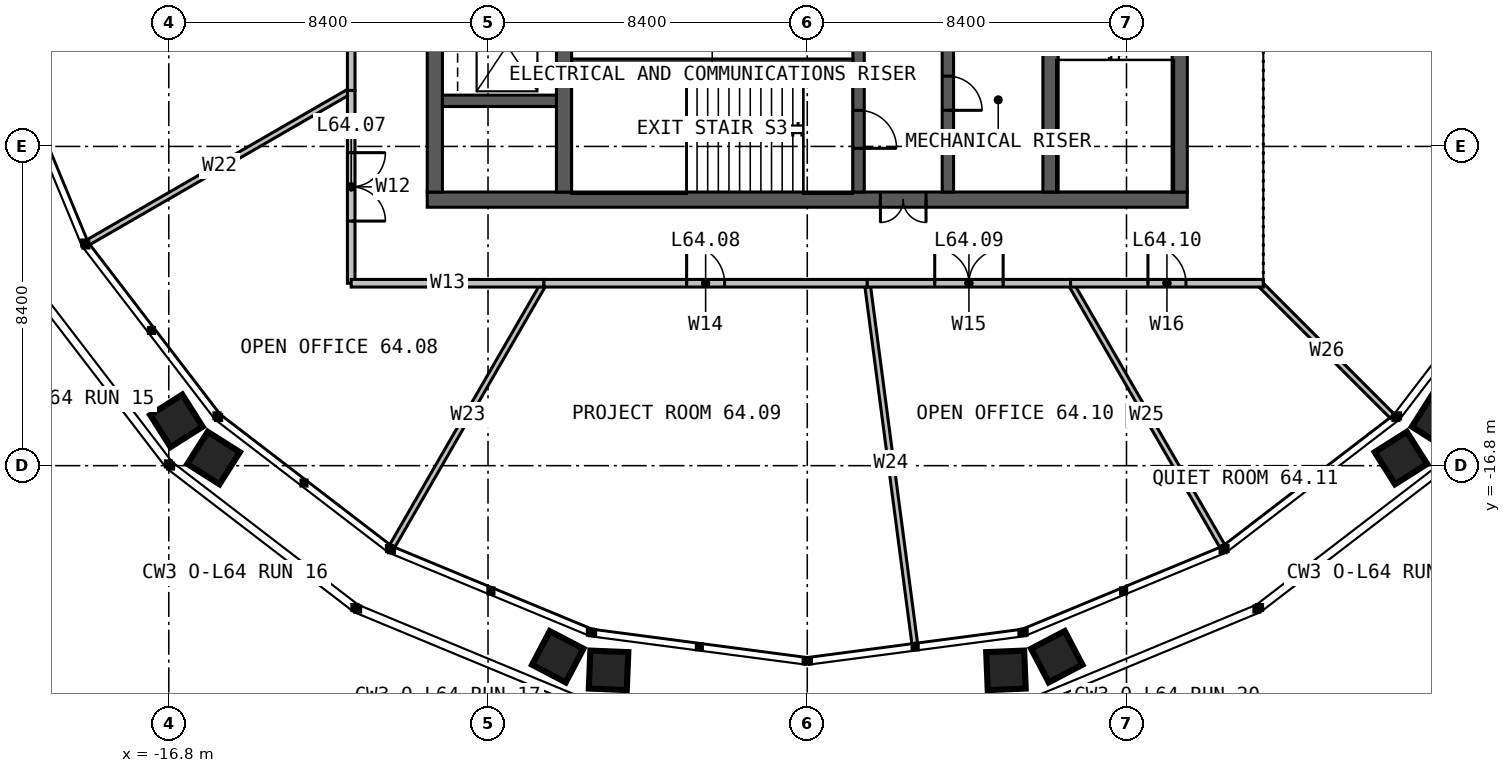
"""IFC4 building model, lengths in metres.
Left out: names, types, materials, properties, quantities, classifications, styles, units other than length and angle.
Written with IfcOpenShell. Run it as: python <this file> out.ifc"""

import sys

from ifc_helpers import new_model, si_unit, direction, frame, frame_2d, origin, place, context, subcontext, project, spatial, rectangle, extrude, element, fill, save


model = new_model("IFC4")
c1 = context("Model", 3, precision=1e-05, world=origin(), true_north=direction((0.0, 1.0)))
c2 = subcontext(c1, "Body", "Model", "MODEL_VIEW")
j1 = project(units=[si_unit("LENGTHUNIT", "METRE"), si_unit("PLANEANGLEUNIT", "RADIAN")], contexts=[c1])
p1 = place(None, origin())
s1 = spatial("IfcSite", under=j1, at=p1, CompositionType="ELEMENT")
p2 = place(p1, origin())
s2 = spatial("IfcBuilding", under=s1, at=p2, CompositionType="ELEMENT")
p3 = place(p2, frame((0.0, 0.0, 264.0)))
s3 = spatial("IfcBuildingStorey", under=s2, at=p3, CompositionType="ELEMENT", Elevation=264.0)
p4 = place(p3, frame((10.0, -9.8, 0.0), z_axis=(0.0, 0.0, 1.0), x_axis=(-1.0, 0.0, 0.0)))
e1 = element("IfcWall", 1, at=p4, inside=s3, PredefinedType="SOLIDWALL", context=c2, shape_type="SweptSolid", body=[
    extrude(rectangle(XDim=20.0, YDim=0.4, at=frame_2d((10.0, 0.0))), origin(), (0.0, 0.0, 1.0), 4.0),
])
p5 = place(p4, frame((6.875, 0.0, 0.0)))
e2 = element("IfcOpeningElement", 2, at=p5, cuts=e1, PredefinedType="OPENING", context=c2, shape_type="SweptSolid", body=[
    extrude(rectangle(XDim=1.2, YDim=2.2, at=frame_2d((0.6, 1.1))), frame((0.0, 0.21, 0.0), z_axis=(0.0, -1.0, 0.0), x_axis=(1.0, 0.0, 0.0)), (0.0, 0.0, 1.0), 0.42),
])
for number, where, z_axis, x_axis in (
    (3, (9.8, -9.6, 0.0), (0.0, 0.0, 1.0), (0.0, 1.0, 0.0)),
    (4, (-9.8, 9.6, 0.0), (0.0, 0.0, 1.0), (0.0, -1.0, 0.0)),
):
    element("IfcWall", number, at=place(p3, frame(where, z_axis=z_axis, x_axis=x_axis)), inside=s3, PredefinedType="SOLIDWALL", context=c2, shape_type="SweptSolid", body=[
        extrude(rectangle(XDim=19.2, YDim=0.4, at=frame_2d((9.6, 0.0))), origin(), (0.0, 0.0, 1.0), 4.0),
    ])
p6 = place(p3, frame((-6.4, -9.6, 0.0), z_axis=(0.0, 0.0, 1.0), x_axis=(0.0, 1.0, 0.0)))
e5 = element("IfcWall", 5, at=p6, inside=s3, PredefinedType="SOLIDWALL", context=c2, shape_type="SweptSolid", body=[
    extrude(rectangle(XDim=19.2, YDim=0.4, at=frame_2d((9.6, 0.0))), origin(), (0.0, 0.0, 1.0), 4.0),
])
p7 = place(p6, frame((9.1, 0.0, 0.0)))
e6 = element("IfcOpeningElement", 6, at=p7, cuts=e5, PredefinedType="OPENING", context=c2, shape_type="SweptSolid", body=[
    extrude(rectangle(XDim=1.0, YDim=2.2, at=frame_2d((0.5, 1.1))), frame((0.0, 0.21, 0.0), z_axis=(0.0, -1.0, 0.0), x_axis=(1.0, 0.0, 0.0)), (0.0, 0.0, 1.0), 0.42),
])
p8 = place(p3, frame((6.4, 9.6, 0.0), z_axis=(0.0, 0.0, 1.0), x_axis=(0.0, -1.0, 0.0)))
e7 = element("IfcWall", 7, at=p8, inside=s3, PredefinedType="SOLIDWALL", context=c2, shape_type="SweptSolid", body=[
    extrude(rectangle(XDim=19.2, YDim=0.4, at=frame_2d((9.6, 0.0))), origin(), (0.0, 0.0, 1.0), 4.0),
])
p9 = place(p8, frame((9.1, 0.0, 0.0)))
e8 = element("IfcOpeningElement", 8, at=p9, cuts=e7, PredefinedType="OPENING", context=c2, shape_type="SweptSolid", body=[
    extrude(rectangle(XDim=1.0, YDim=2.2, at=frame_2d((0.5, 1.1))), frame((0.0, 0.21, 0.0), z_axis=(0.0, -1.0, 0.0), x_axis=(1.0, 0.0, 0.0)), (0.0, 0.0, 1.0), 0.42),
])
p10 = place(p3, frame((1.35, -1.45, 0.0), z_axis=(0.0, 0.0, 1.0), x_axis=(0.0, -1.0, 0.0)))
e9 = element("IfcWall", 9, at=p10, inside=s3, PredefinedType="SOLIDWALL", context=c2, shape_type="SweptSolid", body=[
    extrude(rectangle(XDim=8.15, YDim=0.3, at=frame_2d((4.075, 0.0))), origin(), (0.0, 0.0, 1.0), 4.0),
])
p11 = place(p10, frame((6.0, 0.0, 0.0)))
e10 = element("IfcOpeningElement", 10, at=p11, cuts=e9, PredefinedType="OPENING", context=c2, shape_type="SweptSolid", body=[
    extrude(rectangle(XDim=1.0, YDim=2.2, at=frame_2d((0.5, 1.1))), frame((0.0, 0.16, 0.0), z_axis=(0.0, -1.0, 0.0), x_axis=(1.0, 0.0, 0.0)), (0.0, 0.0, 1.0), 0.32),
])
p12 = place(p10, frame((3.525, 0.0, 0.0)))
e11 = element("IfcOpeningElement", 11, at=p12, cuts=e9, PredefinedType="OPENING", context=c2, shape_type="SweptSolid", body=[
    extrude(rectangle(XDim=0.9, YDim=2.2, at=frame_2d((0.45, 1.1))), frame((0.0, 0.16, 0.0), z_axis=(0.0, -1.0, 0.0), x_axis=(1.0, 0.0, 0.0)), (0.0, 0.0, 1.0), 0.32),
])
p13 = place(p3, frame((3.7, -1.45, 0.0), z_axis=(0.0, 0.0, 1.0), x_axis=(0.0, -1.0, 0.0)))
e12 = element("IfcWall", 12, at=p13, inside=s3, PredefinedType="SOLIDWALL", context=c2, shape_type="SweptSolid", body=[
    extrude(rectangle(XDim=8.15, YDim=0.3, at=frame_2d((4.075, 0.0))), origin(), (0.0, 0.0, 1.0), 4.0),
])
p14 = place(p13, frame((5.1, 0.0, 0.0)))
e13 = element("IfcOpeningElement", 13, at=p14, cuts=e12, PredefinedType="OPENING", context=c2, shape_type="SweptSolid", body=[
    extrude(rectangle(XDim=0.9, YDim=2.2, at=frame_2d((0.45, 1.1))), frame((0.0, 0.16, 0.0), z_axis=(0.0, -1.0, 0.0), x_axis=(1.0, 0.0, 0.0)), (0.0, 0.0, 1.0), 0.32),
])
p15 = place(p3, frame((-6.2, -6.2, 0.0), z_axis=(0.0, 0.0, 1.0), x_axis=(1.0, 0.0, 0.0)))
e14 = element("IfcWall", 14, at=p15, inside=s3, PredefinedType="SOLIDWALL", context=c2, shape_type="SweptSolid", body=[
    extrude(rectangle(XDim=7.4, YDim=0.2, at=frame_2d((3.7, 0.0))), origin(), (0.0, 0.0, 1.0), 4.0),
])
p16 = place(p3, frame((-9.6, -7.2, 0.0), z_axis=(0.0, 0.0, 1.0), x_axis=(1.0, 0.0, 0.0)))
e15 = element("IfcWall", 15, at=p16, inside=s3, PredefinedType="SOLIDWALL", context=c2, shape_type="SweptSolid", body=[
    extrude(rectangle(XDim=3.0, YDim=0.3, at=frame_2d((1.5, 0.0))), origin(), (0.0, 0.0, 1.0), 4.0),
])
p17 = place(p3, frame((11.947, -12.053, 0.0), z_axis=(0.0, 0.0, 1.0), x_axis=(0.707106781187, -0.707106781187, 0.0)))
e16 = element("IfcWall", 16, at=p17, inside=s3, PredefinedType="PARTITIONING", context=c2, shape_type="SweptSolid", body=[
    extrude(rectangle(XDim=4.878, YDim=0.15, at=frame_2d((2.439, 0.0))), origin(), (0.0, 0.0, 1.0), 2.79),
])
for number, where, z_axis, x_axis in (
    (17, (-12.0, -6.928, 0.0), (0.0, 0.0, 1.0), (-0.866, -0.5, 0.0)),
    (18, (-6.928, -12.0, 0.0), (0.0, 0.0, 1.0), (-0.5, -0.866, 0.0)),
):
    element("IfcWall", number, at=place(p3, frame(where, z_axis=z_axis, x_axis=x_axis)), inside=s3, PredefinedType="PARTITIONING", context=c2, shape_type="SweptSolid", body=[
        extrude(rectangle(XDim=7.992, YDim=0.15, at=frame_2d((3.996, 0.0))), origin(), (0.0, 0.0, 1.0), 2.79),
    ])
p18 = place(p3, frame((1.58, -12.0, 0.0), z_axis=(0.0, 0.0, 1.0), x_axis=(0.130527195513, -0.991444729287, 0.0)))
e19 = element("IfcWall", 19, at=p18, inside=s3, PredefinedType="PARTITIONING", context=c2, shape_type="SweptSolid", body=[
    extrude(rectangle(XDim=9.558, YDim=0.15, at=frame_2d((4.779, 0.0))), origin(), (0.0, 0.0, 1.0), 2.79),
])
p19 = place(p3, frame((6.928, -12.0, 0.0), z_axis=(0.0, 0.0, 1.0), x_axis=(0.499993062769, -0.86602940896, 0.0)))
e20 = element("IfcWall", 20, at=p19, inside=s3, PredefinedType="PARTITIONING", context=c2, shape_type="SweptSolid", body=[
    extrude(rectangle(XDim=7.992, YDim=0.15, at=frame_2d((3.996, 0.0))), origin(), (0.0, 0.0, 1.0), 2.79),
])
p20 = place(p3, frame((-12.0, 6.928, 0.0), z_axis=(0.0, 0.0, 1.0), x_axis=(0.0, -1.0, 0.0)))
e21 = element("IfcWall", 21, at=p20, inside=s3, PredefinedType="PARTITIONING", context=c2, shape_type="SweptSolid", body=[
    extrude(rectangle(XDim=13.856, YDim=0.2, at=frame_2d((6.928, 0.0))), origin(), (0.0, 0.0, 1.0), 3.8),
])
p21 = place(p20, frame((6.028, 0.0, 0.0)))
e22 = element("IfcOpeningElement", 22, at=p21, cuts=e21, PredefinedType="OPENING", context=c2, shape_type="SweptSolid", body=[
    extrude(rectangle(XDim=1.8, YDim=2.2, at=frame_2d((0.9, 1.1))), frame((0.0, 0.11, 0.0), z_axis=(0.0, -1.0, 0.0), x_axis=(1.0, 0.0, 0.0)), (0.0, 0.0, 1.0), 0.22),
])
p22 = place(p3, frame((-12.0, -6.928, 0.0), z_axis=(0.0, 0.0, 1.0), x_axis=(0.0, -1.0, 0.0)))
e23 = element("IfcWall", 23, at=p22, inside=s3, PredefinedType="PARTITIONING", context=c2, shape_type="SweptSolid", body=[
    extrude(rectangle(XDim=5.072, YDim=0.2, at=frame_2d((2.536, 0.0))), origin(), (0.0, 0.0, 1.0), 3.8),
])
p23 = place(p22, frame((1.636, 0.0, 0.0)))
e24 = element("IfcOpeningElement", 24, at=p23, cuts=e23, PredefinedType="OPENING", context=c2, shape_type="SweptSolid", body=[
    extrude(rectangle(XDim=1.8, YDim=2.2, at=frame_2d((0.9, 1.1))), frame((0.0, 0.11, 0.0), z_axis=(0.0, -1.0, 0.0), x_axis=(1.0, 0.0, 0.0)), (0.0, 0.0, 1.0), 0.22),
])
p24 = place(p3, frame((-12.0, -12.0, 0.0), z_axis=(0.0, 0.0, 1.0), x_axis=(1.0, 0.0, 0.0)))
e25 = element("IfcWall", 25, at=p24, inside=s3, PredefinedType="PARTITIONING", context=c2, shape_type="SweptSolid", body=[
    extrude(rectangle(XDim=5.072, YDim=0.2, at=frame_2d((2.536, 0.0))), origin(), (0.0, 0.0, 1.0), 3.8),
])
p25 = place(p3, frame((-6.928, -12.0, 0.0), z_axis=(0.0, 0.0, 1.0), x_axis=(1.0, 0.0, 0.0)))
e26 = element("IfcWall", 26, at=p25, inside=s3, PredefinedType="PARTITIONING", context=c2, shape_type="SweptSolid", body=[
    extrude(rectangle(XDim=8.508, YDim=0.2, at=frame_2d((4.254, 0.0))), origin(), (0.0, 0.0, 1.0), 3.8),
])
p26 = place(p25, frame((3.754, 0.0, 0.0)))
e27 = element("IfcOpeningElement", 27, at=p26, cuts=e26, PredefinedType="OPENING", context=c2, shape_type="SweptSolid", body=[
    extrude(rectangle(XDim=1.0, YDim=2.2, at=frame_2d((0.5, 1.1))), frame((0.0, 0.11, 0.0), z_axis=(0.0, -1.0, 0.0), x_axis=(1.0, 0.0, 0.0)), (0.0, 0.0, 1.0), 0.22),
])
p27 = place(p3, frame((1.58, -12.0, 0.0), z_axis=(0.0, 0.0, 1.0), x_axis=(1.0, 0.0, 0.0)))
e28 = element("IfcWall", 28, at=p27, inside=s3, PredefinedType="PARTITIONING", context=c2, shape_type="SweptSolid", body=[
    extrude(rectangle(XDim=5.348, YDim=0.2, at=frame_2d((2.674, 0.0))), origin(), (0.0, 0.0, 1.0), 3.8),
])
p28 = place(p27, frame((1.774, 0.0, 0.0)))
e29 = element("IfcOpeningElement", 29, at=p28, cuts=e28, PredefinedType="OPENING", context=c2, shape_type="SweptSolid", body=[
    extrude(rectangle(XDim=1.8, YDim=2.2, at=frame_2d((0.9, 1.1))), frame((0.0, 0.11, 0.0), z_axis=(0.0, -1.0, 0.0), x_axis=(1.0, 0.0, 0.0)), (0.0, 0.0, 1.0), 0.22),
])
p29 = place(p3, frame((6.928, -12.0, 0.0), z_axis=(0.0, 0.0, 1.0), x_axis=(1.0, 0.0, 0.0)))
e30 = element("IfcWall", 30, at=p29, inside=s3, PredefinedType="PARTITIONING", context=c2, shape_type="SweptSolid", body=[
    extrude(rectangle(XDim=5.072, YDim=0.2, at=frame_2d((2.536, 0.0))), origin(), (0.0, 0.0, 1.0), 3.8),
])
p30 = place(p29, frame((2.036, 0.0, 0.0)))
e31 = element("IfcOpeningElement", 31, at=p30, cuts=e30, PredefinedType="OPENING", context=c2, shape_type="SweptSolid", body=[
    extrude(rectangle(XDim=1.0, YDim=2.2, at=frame_2d((0.5, 1.1))), frame((0.0, 0.11, 0.0), z_axis=(0.0, -1.0, 0.0), x_axis=(1.0, 0.0, 0.0)), (0.0, 0.0, 1.0), 0.22),
])
p31 = place(p5, origin())
e32 = element("IfcDoor", 32, at=p31, inside=s3, OperationType="DOUBLE_DOOR_SINGLE_SWING", PredefinedType="DOOR", context=c2, shape_type="SweptSolid", body=[
    extrude(rectangle(XDim=1.2, YDim=2.2, at=frame_2d((0.6, 1.1))), frame((0.0, 0.025, 0.0), z_axis=(0.0, -1.0, 0.0), x_axis=(1.0, 0.0, 0.0)), (0.0, 0.0, 1.0), 0.05),
])
fill(e2, e32)
p32 = place(p11, origin())
e33 = element("IfcDoor", 33, at=p32, inside=s3, OperationType="SINGLE_SWING_RIGHT", PredefinedType="DOOR", context=c2, shape_type="SweptSolid", body=[
    extrude(rectangle(XDim=1.0, YDim=2.2, at=frame_2d((0.5, 1.1))), frame((0.0, 0.025, 0.0), z_axis=(0.0, -1.0, 0.0), x_axis=(1.0, 0.0, 0.0)), (0.0, 0.0, 1.0), 0.05),
])
fill(e10, e33)
p33 = place(p14, origin())
e34 = element("IfcDoor", 34, at=p33, inside=s3, OperationType="SINGLE_SWING_RIGHT", PredefinedType="DOOR", context=c2, shape_type="SweptSolid", body=[
    extrude(rectangle(XDim=0.9, YDim=2.2, at=frame_2d((0.45, 1.1))), frame((0.0, 0.025, 0.0), z_axis=(0.0, -1.0, 0.0), x_axis=(1.0, 0.0, 0.0)), (0.0, 0.0, 1.0), 0.05),
])
fill(e13, e34)
p34 = place(p23, origin())
e35 = element("IfcDoor", 35, at=p34, inside=s3, OperationType="DOUBLE_DOOR_SINGLE_SWING", PredefinedType="DOOR", context=c2, shape_type="SweptSolid", body=[
    extrude(rectangle(XDim=1.8, YDim=2.2, at=frame_2d((0.9, 1.1))), frame((0.0, 0.025, 0.0), z_axis=(0.0, -1.0, 0.0), x_axis=(1.0, 0.0, 0.0)), (0.0, 0.0, 1.0), 0.05),
])
fill(e24, e35)
p35 = place(p26, origin())
e36 = element("IfcDoor", 36, at=p35, inside=s3, OperationType="SINGLE_SWING_LEFT", PredefinedType="DOOR", context=c2, shape_type="SweptSolid", body=[
    extrude(rectangle(XDim=1.0, YDim=2.2, at=frame_2d((0.5, 1.1))), frame((0.0, 0.025, 0.0), z_axis=(0.0, -1.0, 0.0), x_axis=(1.0, 0.0, 0.0)), (0.0, 0.0, 1.0), 0.05),
])
fill(e27, e36)
p36 = place(p28, origin())
e37 = element("IfcDoor", 37, at=p36, inside=s3, OperationType="DOUBLE_DOOR_SINGLE_SWING", PredefinedType="DOOR", context=c2, shape_type="SweptSolid", body=[
    extrude(rectangle(XDim=1.8, YDim=2.2, at=frame_2d((0.9, 1.1))), frame((0.0, 0.025, 0.0), z_axis=(0.0, -1.0, 0.0), x_axis=(1.0, 0.0, 0.0)), (0.0, 0.0, 1.0), 0.05),
])
fill(e29, e37)
p37 = place(p30, origin())
e38 = element("IfcDoor", 38, at=p37, inside=s3, OperationType="SINGLE_SWING_LEFT", PredefinedType="DOOR", context=c2, shape_type="SweptSolid", body=[
    extrude(rectangle(XDim=1.0, YDim=2.2, at=frame_2d((0.5, 1.1))), frame((0.0, 0.025, 0.0), z_axis=(0.0, -1.0, 0.0), x_axis=(1.0, 0.0, 0.0)), (0.0, 0.0, 1.0), 0.05),
])
fill(e31, e38)
save(model, sys.argv[1])
